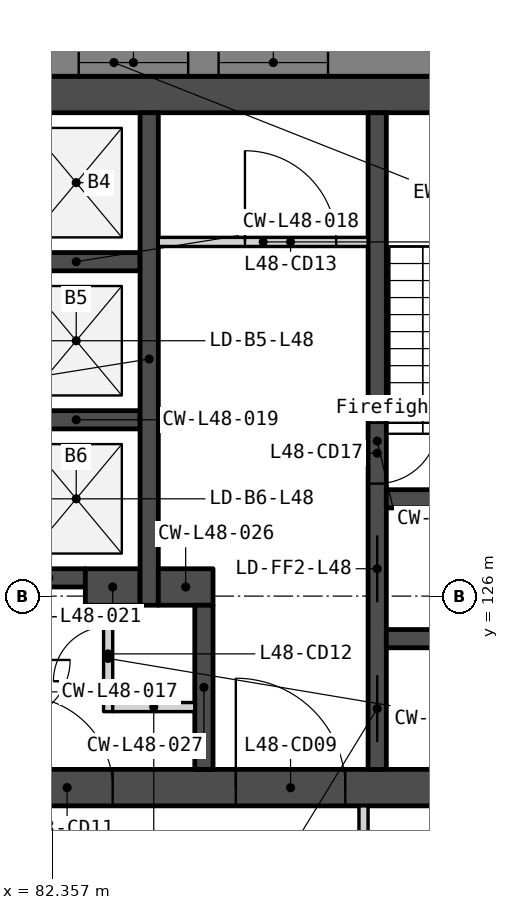
"""IFC4 building model, lengths in metres.
Left out: names, types, materials, properties, quantities, classifications, styles, units other than length and angle.
Written with IfcOpenShell. Run it as: python <this file> out.ifc"""

import sys

from ifc_helpers import new_model, si_unit, direction, frame, frame_2d, origin, place, context, subcontext, project, spatial, polyline, rectangle, outline, extrude, element, fill, save


model = new_model("IFC4")
c1 = context("Model", 3, precision=1e-05, world=origin(), true_north=direction((0.0, 1.0)))
c2 = subcontext(c1, "Body", "Model", "MODEL_VIEW")
j1 = project(units=[si_unit("LENGTHUNIT", "METRE"), si_unit("PLANEANGLEUNIT", "RADIAN")], contexts=[c1])
p1 = place(None, origin())
s1 = spatial("IfcSite", under=j1, at=p1, CompositionType="ELEMENT")
p2 = place(p1, origin())
s2 = spatial("IfcBuilding", under=s1, at=p2, CompositionType="ELEMENT")
p3 = place(p2, frame((0.0, 0.0, 191.9)))
s3 = spatial("IfcBuildingStorey", under=s2, at=p3, CompositionType="ELEMENT", Elevation=191.9)
p4 = place(p3, frame((69.0, 134.25, 0.0), z_axis=(0.0, 0.0, 1.0), x_axis=(1.0, 0.0, 0.0)))
e1 = element("IfcWall", 1, at=p4, inside=s3, PredefinedType="SOLIDWALL", context=c2, shape_type="SweptSolid", body=[
    extrude(rectangle(XDim=22.0, YDim=0.6, at=frame_2d((11.0, 0.0))), origin(), (0.0, 0.0, 1.0), 3.75),
])
p5 = place(p3, frame((69.0, 122.85, 0.0), z_axis=(0.0, 0.0, 1.0), x_axis=(1.0, 0.0, 0.0)))
e2 = element("IfcWall", 2, at=p5, inside=s3, PredefinedType="SOLIDWALL", context=c2, shape_type="SweptSolid", body=[
    extrude(rectangle(XDim=22.0, YDim=0.6, at=frame_2d((11.0, 0.0))), origin(), (0.0, 0.0, 1.0), 3.75),
])
p6 = place(p5, frame((16.375, 0.0, 0.0)))
e3 = element("IfcOpeningElement", 3, at=p6, cuts=e2, PredefinedType="OPENING", context=c2, shape_type="SweptSolid", body=[
    extrude(rectangle(XDim=1.8, YDim=2.1, at=frame_2d((0.9, 1.05))), frame((0.0, 0.31, 0.0), z_axis=(0.0, -1.0, 0.0), x_axis=(1.0, 0.0, 0.0)), (0.0, 0.0, 1.0), 0.62),
])
p7 = place(p5, frame((3.825, 0.0, 0.0)))
e4 = element("IfcOpeningElement", 4, at=p7, cuts=e2, PredefinedType="OPENING", context=c2, shape_type="SweptSolid", body=[
    extrude(rectangle(XDim=1.8, YDim=2.1, at=frame_2d((0.9, 1.05))), frame((0.0, 0.31, 0.0), z_axis=(0.0, -1.0, 0.0), x_axis=(1.0, 0.0, 0.0)), (0.0, 0.0, 1.0), 0.62),
])
p8 = place(p5, frame((12.85, 0.0, 0.0)))
e5 = element("IfcOpeningElement", 5, at=p8, cuts=e2, PredefinedType="OPENING", context=c2, shape_type="SweptSolid", body=[
    extrude(rectangle(XDim=1.5, YDim=2.1, at=frame_2d((0.75, 1.05))), frame((0.0, 0.31, 0.0), z_axis=(0.0, -1.0, 0.0), x_axis=(1.0, 0.0, 0.0)), (0.0, 0.0, 1.0), 0.62),
])
for number, where, z_axis, x_axis in (
    (6, (81.7, 131.5, 0.0), (0.0, 0.0, 1.0), (1.0, 0.0, 0.0)),
    (7, (81.7, 128.9, 0.0), (0.0, 0.0, 1.0), (1.0, 0.0, 0.0)),
):
    element("IfcWall", number, at=place(p3, frame(where, z_axis=z_axis, x_axis=x_axis)), inside=s3, PredefinedType="SOLIDWALL", context=c2, shape_type="SweptSolid", body=[
        extrude(rectangle(XDim=2.1, YDim=0.3, at=frame_2d((1.05, 0.0))), origin(), (0.0, 0.0, 1.0), 3.75),
    ])
p9 = place(p3, frame((81.7, 126.3, 0.0), z_axis=(0.0, 0.0, 1.0), x_axis=(1.0, 0.0, 0.0)))
e8 = element("IfcWall", 8, at=p9, inside=s3, PredefinedType="SOLIDWALL", context=c2, shape_type="SweptSolid", body=[
    extrude(rectangle(XDim=1.2, YDim=0.3, at=frame_2d((0.6, 0.0))), origin(), (0.0, 0.0, 1.0), 3.75),
])
p10 = place(p3, frame((82.9, 126.15, 0.0), z_axis=(0.0, 0.0, 1.0), x_axis=(1.0, 0.0, 0.0)))
e9 = element("IfcWall", 9, at=p10, inside=s3, PredefinedType="SOLIDWALL", context=c2, shape_type="SweptSolid", body=[
    extrude(rectangle(XDim=0.9, YDim=0.6, at=frame_2d((0.45, 0.0))), origin(), (0.0, 0.0, 1.0), 3.75),
])
p11 = place(p3, frame((83.275, 125.85, 0.0), z_axis=(0.0, 0.0, 1.0), x_axis=(0.0, -1.0, 0.0)))
e10 = element("IfcWall", 10, at=p11, inside=s3, PredefinedType="PARTITIONING", context=c2, shape_type="SweptSolid", body=[
    extrude(rectangle(XDim=1.75, YDim=0.15, at=frame_2d((0.875, 0.0))), origin(), (0.0, 0.0, 1.0), 3.75),
])
p12 = place(p11, frame((0.35, 0.0, 0.0)))
e11 = element("IfcOpeningElement", 11, at=p12, cuts=e10, PredefinedType="OPENING", context=c2, shape_type="SweptSolid", body=[
    extrude(rectangle(XDim=0.9, YDim=2.1, at=frame_2d((0.45, 1.05))), frame((0.0, 0.085, 0.0), z_axis=(0.0, -1.0, 0.0), x_axis=(1.0, 0.0, 0.0)), (0.0, 0.0, 1.0), 0.17),
])
p13 = place(p3, frame((83.35, 124.175, 0.0), z_axis=(0.0, 0.0, 1.0), x_axis=(1.0, 0.0, 0.0)))
e12 = element("IfcWall", 12, at=p13, inside=s3, PredefinedType="PARTITIONING", context=c2, shape_type="SweptSolid", body=[
    extrude(rectangle(XDim=1.35, YDim=0.15, at=frame_2d((0.675, 0.0))), origin(), (0.0, 0.0, 1.0), 3.75),
])
p14 = place(p3, frame((83.95, 133.95, 0.0), z_axis=(0.0, 0.0, 1.0), x_axis=(0.0, -1.0, 0.0)))
e13 = element("IfcWall", 13, at=p14, inside=s3, PredefinedType="SOLIDWALL", context=c2, shape_type="SweptSolid", body=[
    extrude(rectangle(XDim=8.1, YDim=0.3, at=frame_2d((4.05, 0.0))), origin(), (0.0, 0.0, 1.0), 3.75),
])
p15 = place(p3, frame((84.1, 131.825, 0.0), z_axis=(0.0, 0.0, 1.0), x_axis=(1.0, 0.0, 0.0)))
e14 = element("IfcWall", 14, at=p15, inside=s3, PredefinedType="PARTITIONING", context=c2, shape_type="SweptSolid", body=[
    extrude(rectangle(XDim=3.45, YDim=0.15, at=frame_2d((1.725, 0.0))), origin(), (0.0, 0.0, 1.0), 3.75),
])
p16 = place(p15, frame((1.425, 0.0, 0.0)))
e15 = element("IfcOpeningElement", 15, at=p16, cuts=e14, PredefinedType="OPENING", context=c2, shape_type="SweptSolid", body=[
    extrude(rectangle(XDim=1.5, YDim=2.1, at=frame_2d((0.75, 1.05))), frame((0.0, 0.085, 0.0), z_axis=(0.0, -1.0, 0.0), x_axis=(1.0, 0.0, 0.0)), (0.0, 0.0, 1.0), 0.17),
])
p17 = place(p3, frame((84.1, 126.15, 0.0), z_axis=(0.0, 0.0, 1.0), x_axis=(1.0, 0.0, 0.0)))
e16 = element("IfcWall", 16, at=p17, inside=s3, PredefinedType="SOLIDWALL", context=c2, shape_type="SweptSolid", body=[
    extrude(rectangle(XDim=0.9, YDim=0.6, at=frame_2d((0.45, 0.0))), origin(), (0.0, 0.0, 1.0), 3.75),
])
p18 = place(p3, frame((84.85, 125.85, 0.0), z_axis=(0.0, 0.0, 1.0), x_axis=(0.0, -1.0, 0.0)))
e17 = element("IfcWall", 17, at=p18, inside=s3, PredefinedType="SOLIDWALL", context=c2, shape_type="SweptSolid", body=[
    extrude(rectangle(XDim=2.7, YDim=0.3, at=frame_2d((1.35, 0.0))), origin(), (0.0, 0.0, 1.0), 3.75),
])
p19 = place(p3, frame((87.7, 133.95, 0.0), z_axis=(0.0, 0.0, 1.0), x_axis=(0.0, -1.0, 0.0)))
e18 = element("IfcWall", 18, at=p19, inside=s3, PredefinedType="SOLIDWALL", context=c2, shape_type="SweptSolid", body=[
    extrude(rectangle(XDim=10.8, YDim=0.3, at=frame_2d((5.4, 0.0))), origin(), (0.0, 0.0, 1.0), 3.75),
])
p20 = place(p19, frame((6.95, 0.0, 0.0)))
e19 = element("IfcOpeningElement", 19, at=p20, cuts=e18, PredefinedType="OPENING", context=c2, shape_type="SweptSolid", body=[
    extrude(rectangle(XDim=1.1, YDim=2.1, at=frame_2d((0.55, 1.05))), frame((0.0, 0.16, 0.0), z_axis=(0.0, -1.0, 0.0), x_axis=(1.0, 0.0, 0.0)), (0.0, 0.0, 1.0), 0.32),
])
p21 = place(p19, frame((5.1, 0.0, 0.0)))
e20 = element("IfcOpeningElement", 20, at=p21, cuts=e18, PredefinedType="OPENING", context=c2, shape_type="SweptSolid", body=[
    extrude(rectangle(XDim=1.0, YDim=2.1, at=frame_2d((0.5, 1.05))), frame((0.0, 0.16, 0.0), z_axis=(0.0, -1.0, 0.0), x_axis=(1.0, 0.0, 0.0)), (0.0, 0.0, 1.0), 0.32),
])
p22 = place(p19, frame((9.25, 0.0, 0.0)))
e21 = element("IfcOpeningElement", 21, at=p22, cuts=e18, PredefinedType="OPENING", context=c2, shape_type="SweptSolid", body=[
    extrude(rectangle(XDim=1.1, YDim=2.1, at=frame_2d((0.55, 1.05))), frame((0.0, 0.16, 0.0), z_axis=(0.0, -1.0, 0.0), x_axis=(1.0, 0.0, 0.0)), (0.0, 0.0, 1.0), 0.32),
])
for number, where, z_axis, x_axis in (
    (22, (87.85, 127.6, 0.0), (0.0, 0.0, 1.0), (1.0, 0.0, 0.0)),
    (23, (87.85, 125.3, 0.0), (0.0, 0.0, 1.0), (1.0, 0.0, 0.0)),
):
    element("IfcWall", number, at=place(p3, frame(where, z_axis=z_axis, x_axis=x_axis)), inside=s3, PredefinedType="SOLIDWALL", context=c2, shape_type="SweptSolid", body=[
        extrude(rectangle(XDim=2.55, YDim=0.3, at=frame_2d((1.275, 0.0))), origin(), (0.0, 0.0, 1.0), 3.75),
    ])
p23 = place(p3, frame((99.365, 134.775, -0.15), z_axis=(0.0, 0.0, 1.0), x_axis=(-1.0, 0.0, 0.0)))
e24 = element("IfcWall", 24, at=p23, inside=s3, PredefinedType="SOLIDWALL", context=c2, shape_type="SweptSolid", body=[
    extrude(outline(polyline([(0.0, 0.0), (0.0, 3.9), (31.988, 3.9), (31.988, 0.0), (0.0, 0.0)])), frame((0.0, 0.225, 0.0), z_axis=(0.0, -1.0, 0.0), x_axis=(1.0, 0.0, 0.0)), (0.0, 0.0, 1.0), 0.45),
])
p24 = place(p23, frame((2.791, 0.0, 0.95)))
e25 = element("IfcOpeningElement", 25, at=p24, cuts=e24, PredefinedType="OPENING", context=c2, shape_type="SweptSolid", body=[
    extrude(rectangle(XDim=1.8, YDim=2.2, at=frame_2d((0.9, 1.1))), frame((0.0, 0.235, 0.0), z_axis=(0.0, -1.0, 0.0), x_axis=(1.0, 0.0, 0.0)), (0.0, 0.0, 1.0), 0.47),
])
p25 = place(p23, frame((5.091, 0.0, 0.95)))
e26 = element("IfcOpeningElement", 26, at=p25, cuts=e24, PredefinedType="OPENING", context=c2, shape_type="SweptSolid", body=[
    extrude(rectangle(XDim=1.8, YDim=2.2, at=frame_2d((0.9, 1.1))), frame((0.0, 0.235, 0.0), z_axis=(0.0, -1.0, 0.0), x_axis=(1.0, 0.0, 0.0)), (0.0, 0.0, 1.0), 0.47),
])
p26 = place(p23, frame((12.473, 0.0, 0.95)))
e27 = element("IfcOpeningElement", 27, at=p26, cuts=e24, PredefinedType="OPENING", context=c2, shape_type="SweptSolid", body=[
    extrude(rectangle(XDim=1.8, YDim=2.2, at=frame_2d((0.9, 1.1))), frame((0.0, 0.235, 0.0), z_axis=(0.0, -1.0, 0.0), x_axis=(1.0, 0.0, 0.0)), (0.0, 0.0, 1.0), 0.47),
])
p27 = place(p23, frame((14.773, 0.0, 0.95)))
e28 = element("IfcOpeningElement", 28, at=p27, cuts=e24, PredefinedType="OPENING", context=c2, shape_type="SweptSolid", body=[
    extrude(rectangle(XDim=1.8, YDim=2.2, at=frame_2d((0.9, 1.1))), frame((0.0, 0.235, 0.0), z_axis=(0.0, -1.0, 0.0), x_axis=(1.0, 0.0, 0.0)), (0.0, 0.0, 1.0), 0.47),
])
p28 = place(p23, frame((22.156, 0.0, 0.95)))
e29 = element("IfcOpeningElement", 29, at=p28, cuts=e24, PredefinedType="OPENING", context=c2, shape_type="SweptSolid", body=[
    extrude(rectangle(XDim=1.8, YDim=2.2, at=frame_2d((0.9, 1.1))), frame((0.0, 0.235, 0.0), z_axis=(0.0, -1.0, 0.0), x_axis=(1.0, 0.0, 0.0)), (0.0, 0.0, 1.0), 0.47),
])
p29 = place(p23, frame((24.456, 0.0, 0.95)))
e30 = element("IfcOpeningElement", 30, at=p29, cuts=e24, PredefinedType="OPENING", context=c2, shape_type="SweptSolid", body=[
    extrude(rectangle(XDim=1.8, YDim=2.2, at=frame_2d((0.9, 1.1))), frame((0.0, 0.235, 0.0), z_axis=(0.0, -1.0, 0.0), x_axis=(1.0, 0.0, 0.0)), (0.0, 0.0, 1.0), 0.47),
])
p30 = place(p3, frame((81.505, 98.627, -0.15), z_axis=(0.0, 0.0, 1.0), x_axis=(0.500002199942, 0.866024133644, 0.0)))
e31 = element("IfcWall", 31, at=p30, inside=s3, PredefinedType="SOLIDWALL", context=c2, shape_type="SweptSolid", body=[
    extrude(outline(polyline([(38.729, 0.0), (38.729, 3.9), (0.0, 3.9), (0.0, 0.0), (38.729, 0.0)])), frame((0.0, 0.225, 0.0), z_axis=(0.0, -1.0, 0.0), x_axis=(1.0, 0.0, 0.0)), (0.0, 0.0, 1.0), 0.45),
])
p31 = place(p30, frame((2.791, 0.0, 0.95)))
e32 = element("IfcOpeningElement", 32, at=p31, cuts=e31, PredefinedType="OPENING", context=c2, shape_type="SweptSolid", body=[
    extrude(rectangle(XDim=1.8, YDim=2.2, at=frame_2d((0.9, 1.1))), frame((0.0, 0.235, 0.0), z_axis=(0.0, -1.0, 0.0), x_axis=(1.0, 0.0, 0.0)), (0.0, 0.0, 1.0), 0.47),
])
p32 = place(p30, frame((5.091, 0.0, 0.95)))
e33 = element("IfcOpeningElement", 33, at=p32, cuts=e31, PredefinedType="OPENING", context=c2, shape_type="SweptSolid", body=[
    extrude(rectangle(XDim=1.8, YDim=2.2, at=frame_2d((0.9, 1.1))), frame((0.0, 0.235, 0.0), z_axis=(0.0, -1.0, 0.0), x_axis=(1.0, 0.0, 0.0)), (0.0, 0.0, 1.0), 0.47),
])
p33 = place(p30, frame((12.473, 0.0, 0.95)))
e34 = element("IfcOpeningElement", 34, at=p33, cuts=e31, PredefinedType="OPENING", context=c2, shape_type="SweptSolid", body=[
    extrude(rectangle(XDim=1.8, YDim=2.2, at=frame_2d((0.9, 1.1))), frame((0.0, 0.235, 0.0), z_axis=(0.0, -1.0, 0.0), x_axis=(1.0, 0.0, 0.0)), (0.0, 0.0, 1.0), 0.47),
])
p34 = place(p30, frame((14.773, 0.0, 0.95)))
e35 = element("IfcOpeningElement", 35, at=p34, cuts=e31, PredefinedType="OPENING", context=c2, shape_type="SweptSolid", body=[
    extrude(rectangle(XDim=1.8, YDim=2.2, at=frame_2d((0.9, 1.1))), frame((0.0, 0.235, 0.0), z_axis=(0.0, -1.0, 0.0), x_axis=(1.0, 0.0, 0.0)), (0.0, 0.0, 1.0), 0.47),
])
p35 = place(p30, frame((22.156, 0.0, 0.95)))
e36 = element("IfcOpeningElement", 36, at=p35, cuts=e31, PredefinedType="OPENING", context=c2, shape_type="SweptSolid", body=[
    extrude(rectangle(XDim=1.8, YDim=2.2, at=frame_2d((0.9, 1.1))), frame((0.0, 0.235, 0.0), z_axis=(0.0, -1.0, 0.0), x_axis=(1.0, 0.0, 0.0)), (0.0, 0.0, 1.0), 0.47),
])
p36 = place(p30, frame((24.456, 0.0, 0.95)))
e37 = element("IfcOpeningElement", 37, at=p36, cuts=e31, PredefinedType="OPENING", context=c2, shape_type="SweptSolid", body=[
    extrude(rectangle(XDim=1.8, YDim=2.2, at=frame_2d((0.9, 1.1))), frame((0.0, 0.235, 0.0), z_axis=(0.0, -1.0, 0.0), x_axis=(1.0, 0.0, 0.0)), (0.0, 0.0, 1.0), 0.47),
])
p37 = place(p30, frame((31.838, 0.0, 0.95)))
e38 = element("IfcOpeningElement", 38, at=p37, cuts=e31, PredefinedType="OPENING", context=c2, shape_type="SweptSolid", body=[
    extrude(rectangle(XDim=1.8, YDim=2.2, at=frame_2d((0.9, 1.1))), frame((0.0, 0.235, 0.0), z_axis=(0.0, -1.0, 0.0), x_axis=(1.0, 0.0, 0.0)), (0.0, 0.0, 1.0), 0.47),
])
p38 = place(p30, frame((34.138, 0.0, 0.95)))
e39 = element("IfcOpeningElement", 39, at=p38, cuts=e31, PredefinedType="OPENING", context=c2, shape_type="SweptSolid", body=[
    extrude(rectangle(XDim=1.8, YDim=2.2, at=frame_2d((0.9, 1.1))), frame((0.0, 0.235, 0.0), z_axis=(0.0, -1.0, 0.0), x_axis=(1.0, 0.0, 0.0)), (0.0, 0.0, 1.0), 0.47),
])
p39 = place(p3, frame((87.475, 120.025, 0.0), z_axis=(0.0, 0.0, 1.0), x_axis=(0.0, 1.0, 0.0)))
e40 = element("IfcWall", 40, at=p39, inside=s3, PredefinedType="PARTITIONING", context=c2, shape_type="SweptSolid", body=[
    extrude(rectangle(XDim=2.525, YDim=0.15, at=frame_2d((1.263, 0.0))), origin(), (0.0, 0.0, 1.0), 3.75),
])
p40 = place(p20, origin())
e41 = element("IfcDoor", 41, at=p40, inside=s3, OperationType="SLIDING_TO_LEFT", PredefinedType="DOOR", context=c2, shape_type="SweptSolid", body=[
    extrude(rectangle(XDim=1.1, YDim=2.1, at=frame_2d((0.55, 1.05))), frame((0.0, 0.025, 0.0), z_axis=(0.0, -1.0, 0.0), x_axis=(1.0, 0.0, 0.0)), (0.0, 0.0, 1.0), 0.05),
])
fill(e19, e41)
p41 = place(p6, origin())
e42 = element("IfcDoor", 42, at=p41, inside=s3, OperationType="DOUBLE_DOOR_DOUBLE_SWING", PredefinedType="DOOR", context=c2, shape_type="SweptSolid", body=[
    extrude(rectangle(XDim=1.8, YDim=2.1, at=frame_2d((0.9, 1.05))), frame((0.0, 0.025, 0.0), z_axis=(0.0, -1.0, 0.0), x_axis=(1.0, 0.0, 0.0)), (0.0, 0.0, 1.0), 0.05),
])
fill(e3, e42)
p42 = place(p8, origin())
e43 = element("IfcDoor", 43, at=p42, inside=s3, OperationType="DOUBLE_DOOR_DOUBLE_SWING", PredefinedType="DOOR", context=c2, shape_type="SweptSolid", body=[
    extrude(rectangle(XDim=1.5, YDim=2.1, at=frame_2d((0.75, 1.05))), frame((0.0, 0.025, 0.0), z_axis=(0.0, -1.0, 0.0), x_axis=(1.0, 0.0, 0.0)), (0.0, 0.0, 1.0), 0.05),
])
fill(e5, e43)
p43 = place(p12, origin())
e44 = element("IfcDoor", 44, at=p43, inside=s3, OperationType="SINGLE_SWING_RIGHT", PredefinedType="DOOR", context=c2, shape_type="SweptSolid", body=[
    extrude(rectangle(XDim=0.9, YDim=2.1, at=frame_2d((0.45, 1.05))), frame((0.0, 0.025, 0.0), z_axis=(0.0, -1.0, 0.0), x_axis=(1.0, 0.0, 0.0)), (0.0, 0.0, 1.0), 0.05),
])
fill(e11, e44)
p44 = place(p16, origin())
e45 = element("IfcDoor", 45, at=p44, inside=s3, OperationType="DOUBLE_DOOR_DOUBLE_SWING", PredefinedType="DOOR", context=c2, shape_type="SweptSolid", body=[
    extrude(rectangle(XDim=1.5, YDim=2.1, at=frame_2d((0.75, 1.05))), frame((0.0, 0.025, 0.0), z_axis=(0.0, -1.0, 0.0), x_axis=(1.0, 0.0, 0.0)), (0.0, 0.0, 1.0), 0.05),
])
fill(e15, e45)
p45 = place(p21, origin())
e46 = element("IfcDoor", 46, at=p45, inside=s3, OperationType="SINGLE_SWING_LEFT", PredefinedType="DOOR", context=c2, shape_type="SweptSolid", body=[
    extrude(rectangle(XDim=1.0, YDim=2.1, at=frame_2d((0.5, 1.05))), frame((0.0, 0.025, 0.0), z_axis=(0.0, -1.0, 0.0), x_axis=(1.0, 0.0, 0.0)), (0.0, 0.0, 1.0), 0.05),
])
fill(e20, e46)
p46 = place(p22, origin())
e47 = element("IfcDoor", 47, at=p46, inside=s3, OperationType="SLIDING_TO_LEFT", PredefinedType="DOOR", context=c2, shape_type="SweptSolid", body=[
    extrude(rectangle(XDim=1.1, YDim=2.1, at=frame_2d((0.55, 1.05))), frame((0.0, 0.025, 0.0), z_axis=(0.0, -1.0, 0.0), x_axis=(1.0, 0.0, 0.0)), (0.0, 0.0, 1.0), 0.05),
])
fill(e21, e47)
p47 = place(p26, origin())
e48 = element("IfcWindow", 48, at=p47, inside=s3, PartitioningType="SINGLE_PANEL", PredefinedType="WINDOW", context=c2, shape_type="SweptSolid", body=[
    extrude(rectangle(XDim=1.8, YDim=2.2, at=frame_2d((0.9, 1.1))), frame((0.0, 0.03, 0.0), z_axis=(0.0, -1.0, 0.0), x_axis=(1.0, 0.0, 0.0)), (0.0, 0.0, 1.0), 0.06),
])
fill(e27, e48)
p48 = place(p27, origin())
e49 = element("IfcWindow", 49, at=p48, inside=s3, PartitioningType="SINGLE_PANEL", PredefinedType="WINDOW", context=c2, shape_type="SweptSolid", body=[
    extrude(rectangle(XDim=1.8, YDim=2.2, at=frame_2d((0.9, 1.1))), frame((0.0, 0.03, 0.0), z_axis=(0.0, -1.0, 0.0), x_axis=(1.0, 0.0, 0.0)), (0.0, 0.0, 1.0), 0.06),
])
fill(e28, e49)
save(model, sys.argv[1])
